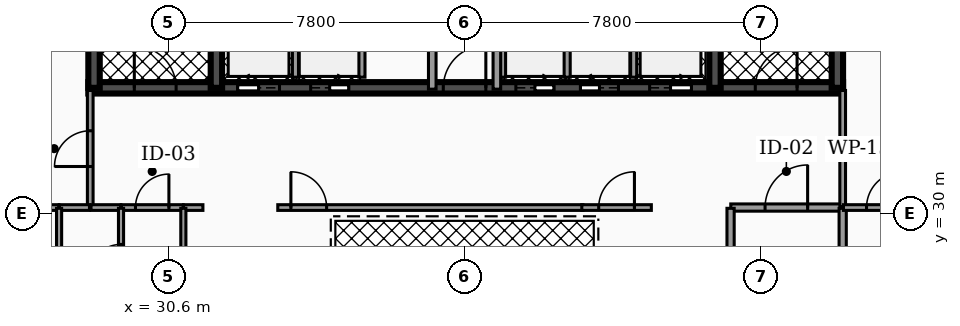
"""IFC4 building model, lengths in metres.
Left out: names, types, materials, properties, quantities, classifications, styles, units other than length and angle.
Written with IfcOpenShell. Run it as: python <this file> out.ifc"""

import sys

from ifc_helpers import new_model, si_unit, direction, frame, frame_2d, origin, place, context, subcontext, project, spatial, rectangle, extrude, element, fill, save


model = new_model("IFC4")
c1 = context("Model", 3, precision=1e-05, world=origin(), true_north=direction((0.0, 1.0)))
c2 = subcontext(c1, "Body", "Model", "MODEL_VIEW")
j1 = project(units=[si_unit("LENGTHUNIT", "METRE"), si_unit("PLANEANGLEUNIT", "RADIAN")], contexts=[c1])
p1 = place(None, origin())
s1 = spatial("IfcSite", under=j1, at=p1, CompositionType="ELEMENT")
p2 = place(p1, origin())
s2 = spatial("IfcBuilding", under=s1, at=p2, CompositionType="ELEMENT")
p3 = place(p2, frame((0.0, 0.0, 218.96)))
s3 = spatial("IfcBuildingStorey", under=s2, at=p3, CompositionType="ELEMENT", Elevation=218.96)
p4 = place(p3, frame((28.5, 33.3, 0.0), z_axis=(0.0, 0.0, 1.0), x_axis=(1.0, 0.0, 0.0)))
e1 = element("IfcWall", 1, at=p4, inside=s3, PredefinedType="SHEAR", context=c2, shape_type="SweptSolid", body=[
    extrude(rectangle(XDim=19.86, YDim=0.3, at=frame_2d((9.93, 0.0))), origin(), (0.0, 0.0, 1.0), 3.18),
])
p5 = place(p4, frame((3.93, 0.0, 0.0)))
e2 = element("IfcOpeningElement", 2, at=p5, cuts=e1, PredefinedType="OPENING", context=c2, shape_type="SweptSolid", body=[
    extrude(rectangle(XDim=1.1, YDim=2.15, at=frame_2d((0.55, 1.075))), frame((0.0, 0.16, 0.0), z_axis=(0.0, -1.0, 0.0), x_axis=(1.0, 0.0, 0.0)), (0.0, 0.0, 1.0), 0.32),
])
p6 = place(p4, frame((14.77, 0.0, 0.0)))
e3 = element("IfcOpeningElement", 3, at=p6, cuts=e1, PredefinedType="OPENING", context=c2, shape_type="SweptSolid", body=[
    extrude(rectangle(XDim=1.1, YDim=2.15, at=frame_2d((0.55, 1.075))), frame((0.0, 0.16, 0.0), z_axis=(0.0, -1.0, 0.0), x_axis=(1.0, 0.0, 0.0)), (0.0, 0.0, 1.0), 0.32),
])
p7 = place(p4, frame((11.25, 0.0, 0.0)))
e4 = element("IfcOpeningElement", 4, at=p7, cuts=e1, PredefinedType="OPENING", context=c2, shape_type="SweptSolid", body=[
    extrude(rectangle(XDim=1.0, YDim=2.1, at=frame_2d((0.5, 1.05))), frame((0.0, 0.16, 0.0), z_axis=(0.0, -1.0, 0.0), x_axis=(1.0, 0.0, 0.0)), (0.0, 0.0, 1.0), 0.32),
])
p8 = place(p4, frame((12.95, 0.0, 0.0)))
e5 = element("IfcOpeningElement", 5, at=p8, cuts=e1, PredefinedType="OPENING", context=c2, shape_type="SweptSolid", body=[
    extrude(rectangle(XDim=1.0, YDim=2.1, at=frame_2d((0.5, 1.05))), frame((0.0, 0.16, 0.0), z_axis=(0.0, -1.0, 0.0), x_axis=(1.0, 0.0, 0.0)), (0.0, 0.0, 1.0), 0.32),
])
p9 = place(p4, frame((5.85, 0.0, 0.0)))
e6 = element("IfcOpeningElement", 6, at=p9, cuts=e1, PredefinedType="OPENING", context=c2, shape_type="SweptSolid", body=[
    extrude(rectangle(XDim=1.0, YDim=2.1, at=frame_2d((0.5, 1.05))), frame((0.0, 0.16, 0.0), z_axis=(0.0, -1.0, 0.0), x_axis=(1.0, 0.0, 0.0)), (0.0, 0.0, 1.0), 0.32),
])
p10 = place(p4, frame((1.21, 0.0, 0.0)))
e7 = element("IfcOpeningElement", 7, at=p10, cuts=e1, PredefinedType="OPENING", context=c2, shape_type="SweptSolid", body=[
    extrude(rectangle(XDim=1.1, YDim=2.2, at=frame_2d((0.55, 1.1))), frame((0.0, 0.16, 0.0), z_axis=(0.0, -1.0, 0.0), x_axis=(1.0, 0.0, 0.0)), (0.0, 0.0, 1.0), 0.32),
])
p11 = place(p4, frame((9.34, 0.0, 0.0)))
e8 = element("IfcOpeningElement", 8, at=p11, cuts=e1, PredefinedType="OPENING", context=c2, shape_type="SweptSolid", body=[
    extrude(rectangle(XDim=1.12, YDim=2.05, at=frame_2d((0.56, 1.025))), frame((0.0, 0.16, 0.0), z_axis=(0.0, -1.0, 0.0), x_axis=(1.0, 0.0, 0.0)), (0.0, 0.0, 1.0), 0.32),
])
p12 = place(p4, frame((17.55, 0.0, 0.0)))
e9 = element("IfcOpeningElement", 9, at=p12, cuts=e1, PredefinedType="OPENING", context=c2, shape_type="SweptSolid", body=[
    extrude(rectangle(XDim=1.1, YDim=2.2, at=frame_2d((0.55, 1.1))), frame((0.0, 0.16, 0.0), z_axis=(0.0, -1.0, 0.0), x_axis=(1.0, 0.0, 0.0)), (0.0, 0.0, 1.0), 0.32),
])
for number, where, z_axis, x_axis in (
    (10, (28.65, 33.3, 0.0), (0.0, 0.0, 1.0), (0.0, 1.0, 0.0)),
    (11, (31.87, 33.3, 0.0), (0.0, 0.0, 1.0), (0.0, 1.0, 0.0)),
    (12, (44.99, 33.3, 0.0), (0.0, 0.0, 1.0), (0.0, 1.0, 0.0)),
    (13, (48.21, 33.3, 0.0), (0.0, 0.0, 1.0), (0.0, 1.0, 0.0)),
):
    element("IfcWall", number, at=place(p3, frame(where, z_axis=z_axis, x_axis=x_axis)), inside=s3, PredefinedType="SHEAR", context=c2, shape_type="SweptSolid", body=[
        extrude(rectangle(XDim=10.1, YDim=0.3, at=frame_2d((5.05, 0.0))), origin(), (0.0, 0.0, 1.0), 3.18),
    ])
for number, where, z_axis, x_axis in (
    (14, (33.95, 33.58, 0.0), (0.0, 0.0, 1.0), (0.0, 1.0, 0.0)),
    (15, (42.85, 33.58, 0.0), (0.0, 0.0, 1.0), (0.0, 1.0, 0.0)),
):
    element("IfcWall", number, at=place(p3, frame(where, z_axis=z_axis, x_axis=x_axis)), inside=s3, PredefinedType="SOLIDWALL", context=c2, shape_type="SweptSolid", body=[
        extrude(rectangle(XDim=2.45, YDim=0.16, at=frame_2d((1.225, 0.0))), origin(), (0.0, 0.0, 1.0), 3.18),
    ])
for number, where, z_axis, x_axis in (
    (16, (39.4, 33.58, 0.0), (0.0, 0.0, 1.0), (0.0, 1.0, 0.0)),
    (17, (41.1, 33.58, 0.0), (0.0, 0.0, 1.0), (0.0, 1.0, 0.0)),
    (18, (35.7, 33.58, 0.0), (0.0, 0.0, 1.0), (0.0, 1.0, 0.0)),
):
    element("IfcWall", number, at=place(p3, frame(where, z_axis=z_axis, x_axis=x_axis)), inside=s3, PredefinedType="SOLIDWALL", context=c2, shape_type="SweptSolid", body=[
        extrude(rectangle(XDim=2.25, YDim=0.16, at=frame_2d((1.125, 0.0))), origin(), (0.0, 0.0, 1.0), 3.18),
    ])
p13 = place(p3, frame((37.55, 33.265, 0.0), z_axis=(0.0, 0.0, 1.0), x_axis=(0.0, 1.0, 0.0)))
e19 = element("IfcWall", 19, at=p13, inside=s3, PredefinedType="PARTITIONING", context=c2, shape_type="SweptSolid", body=[
    extrude(rectangle(XDim=3.615, YDim=0.2, at=frame_2d((1.808, 0.0))), origin(), (0.0, 0.0, 1.0), 2.235),
])
p14 = place(p13, frame((1.367, 0.0, 0.0)))
e20 = element("IfcOpeningElement", 20, at=p14, cuts=e19, PredefinedType="OPENING", context=c2, shape_type="SweptSolid", body=[
    extrude(rectangle(XDim=0.88, YDim=2.05, at=frame_2d((0.44, 1.025))), frame((0.0, 0.11, 0.0), z_axis=(0.0, -1.0, 0.0), x_axis=(1.0, 0.0, 0.0)), (0.0, 0.0, 1.0), 0.22),
])
p15 = place(p3, frame((39.25, 33.265, 0.0), z_axis=(0.0, 0.0, 1.0), x_axis=(0.0, 1.0, 0.0)))
e21 = element("IfcWall", 21, at=p15, inside=s3, PredefinedType="PARTITIONING", context=c2, shape_type="SweptSolid", body=[
    extrude(rectangle(XDim=3.615, YDim=0.2, at=frame_2d((1.808, 0.0))), origin(), (0.0, 0.0, 1.0), 2.235),
])
p16 = place(p3, frame((45.405, 30.15, 0.0), z_axis=(0.0, 0.0, 1.0), x_axis=(1.0, 0.0, 0.0)))
e22 = element("IfcWall", 22, at=p16, inside=s3, PredefinedType="PARTITIONING", context=c2, shape_type="SweptSolid", body=[
    extrude(rectangle(XDim=2.925, YDim=0.19, at=frame_2d((1.462, 0.0))), origin(), (0.0, 0.0, 1.0), 2.235),
])
p17 = place(p16, frame((0.903, 0.0, 0.0)))
e23 = element("IfcOpeningElement", 23, at=p17, cuts=e22, PredefinedType="OPENING", context=c2, shape_type="SweptSolid", body=[
    extrude(rectangle(XDim=1.12, YDim=2.05, at=frame_2d((0.56, 1.025))), frame((0.0, 0.105, 0.0), z_axis=(0.0, -1.0, 0.0), x_axis=(1.0, 0.0, 0.0)), (0.0, 0.0, 1.0), 0.21),
])
p18 = place(p3, frame((28.55, 30.17, 0.0), z_axis=(0.0, 0.0, 1.0), x_axis=(0.0, 1.0, 0.0)))
e24 = element("IfcWall", 24, at=p18, inside=s3, PredefinedType="PARTITIONING", context=c2, shape_type="SweptSolid", body=[
    extrude(rectangle(XDim=3.06, YDim=0.15, at=frame_2d((1.53, 0.0))), origin(), (0.0, 0.0, 1.0), 2.235),
])
p19 = place(p18, frame((1.06, 0.0, 0.0)))
e25 = element("IfcOpeningElement", 25, at=p19, cuts=e24, PredefinedType="OPENING", context=c2, shape_type="SweptSolid", body=[
    extrude(rectangle(XDim=0.94, YDim=2.05, at=frame_2d((0.47, 1.025))), frame((0.0, 0.085, 0.0), z_axis=(0.0, -1.0, 0.0), x_axis=(1.0, 0.0, 0.0)), (0.0, 0.0, 1.0), 0.17),
])
p20 = place(p3, frame((48.35, 30.17, 0.0), z_axis=(0.0, 0.0, 1.0), x_axis=(0.0, 1.0, 0.0)))
e26 = element("IfcWall", 26, at=p20, inside=s3, PredefinedType="PARTITIONING", context=c2, shape_type="SweptSolid", body=[
    extrude(rectangle(XDim=3.06, YDim=0.15, at=frame_2d((1.53, 0.0))), origin(), (0.0, 0.0, 1.0), 2.235),
])
p21 = place(p3, frame((29.365, 30.15, 0.0), z_axis=(0.0, 0.0, 1.0), x_axis=(1.0, 0.0, 0.0)))
e27 = element("IfcWall", 27, at=p21, inside=s3, PredefinedType="PARTITIONING", context=c2, shape_type="SweptSolid", body=[
    extrude(rectangle(XDim=1.63, YDim=0.15, at=frame_2d((0.815, 0.0))), origin(), (0.0, 0.0, 1.0), 2.235),
])
p22 = place(p21, frame((0.375, 0.0, 0.0)))
e28 = element("IfcOpeningElement", 28, at=p22, cuts=e27, PredefinedType="OPENING", context=c2, shape_type="SweptSolid", body=[
    extrude(rectangle(XDim=0.88, YDim=2.05, at=frame_2d((0.44, 1.025))), frame((0.0, 0.085, 0.0), z_axis=(0.0, -1.0, 0.0), x_axis=(1.0, 0.0, 0.0)), (0.0, 0.0, 1.0), 0.17),
])
p23 = place(p3, frame((28.57, 30.15, 0.0), z_axis=(0.0, 0.0, 1.0), x_axis=(1.0, 0.0, 0.0)))
e29 = element("IfcWall", 29, at=p23, inside=s3, PredefinedType="PARTITIONING", context=c2, shape_type="SweptSolid", body=[
    extrude(rectangle(XDim=0.785, YDim=0.15, at=frame_2d((0.393, 0.0))), origin(), (0.0, 0.0, 1.0), 2.235),
])
p24 = place(p3, frame((33.485, 30.15, 0.0), z_axis=(0.0, 0.0, 1.0), x_axis=(1.0, 0.0, 0.0)))
e30 = element("IfcWall", 30, at=p24, inside=s3, PredefinedType="PARTITIONING", context=c2, shape_type="SweptSolid", body=[
    extrude(rectangle(XDim=8.03, YDim=0.15, at=frame_2d((4.015, 0.0))), origin(), (0.0, 0.0, 1.0), 2.235),
])
p25 = place(p24, frame((0.345, 0.0, 0.0)))
e31 = element("IfcOpeningElement", 31, at=p25, cuts=e30, PredefinedType="OPENING", context=c2, shape_type="SweptSolid", body=[
    extrude(rectangle(XDim=0.94, YDim=2.05, at=frame_2d((0.47, 1.025))), frame((0.0, 0.085, 0.0), z_axis=(0.0, -1.0, 0.0), x_axis=(1.0, 0.0, 0.0)), (0.0, 0.0, 1.0), 0.17),
])
p26 = place(p3, frame((31.005, 30.15, 0.0), z_axis=(0.0, 0.0, 1.0), x_axis=(1.0, 0.0, 0.0)))
e32 = element("IfcWall", 32, at=p26, inside=s3, PredefinedType="PARTITIONING", context=c2, shape_type="SweptSolid", body=[
    extrude(rectangle(XDim=0.51, YDim=0.15, at=frame_2d((0.255, 0.0))), origin(), (0.0, 0.0, 1.0), 2.235),
])
p27 = place(p3, frame((41.485, 30.15, 0.0), z_axis=(0.0, 0.0, 1.0), x_axis=(1.0, 0.0, 0.0)))
e33 = element("IfcWall", 33, at=p27, inside=s3, PredefinedType="PARTITIONING", context=c2, shape_type="SweptSolid", body=[
    extrude(rectangle(XDim=1.83, YDim=0.15, at=frame_2d((0.915, 0.0))), origin(), (0.0, 0.0, 1.0), 2.235),
])
p28 = place(p27, frame((0.445, 0.0, 0.0)))
e34 = element("IfcOpeningElement", 34, at=p28, cuts=e33, PredefinedType="OPENING", context=c2, shape_type="SweptSolid", body=[
    extrude(rectangle(XDim=0.94, YDim=2.05, at=frame_2d((0.47, 1.025))), frame((0.0, 0.085, 0.0), z_axis=(0.0, -1.0, 0.0), x_axis=(1.0, 0.0, 0.0)), (0.0, 0.0, 1.0), 0.17),
])
for number, where, z_axis, x_axis in (
    (35, (45.4, 27.37, 0.0), (0.0, 0.0, 1.0), (0.0, 1.0, 0.0)),
    (36, (48.35, 27.37, 0.0), (0.0, 0.0, 1.0), (0.0, 1.0, 0.0)),
):
    element("IfcWall", number, at=place(p3, frame(where, z_axis=z_axis, x_axis=x_axis)), inside=s3, PredefinedType="PARTITIONING", context=c2, shape_type="SweptSolid", body=[
        extrude(rectangle(XDim=2.76, YDim=0.19, at=frame_2d((1.38, 0.0))), origin(), (0.0, 0.0, 1.0), 2.235),
    ])
p29 = place(p3, frame((26.275, 30.15, 0.0), z_axis=(0.0, 0.0, 1.0), x_axis=(1.0, 0.0, 0.0)))
e37 = element("IfcWall", 37, at=p29, inside=s3, PredefinedType="PARTITIONING", context=c2, shape_type="SweptSolid", body=[
    extrude(rectangle(XDim=1.45, YDim=0.15, at=frame_2d((0.725, 0.0))), origin(), (0.0, 0.0, 1.0), 2.235),
])
p30 = place(p29, frame((0.285, 0.0, 0.0)))
e38 = element("IfcOpeningElement", 38, at=p30, cuts=e37, PredefinedType="OPENING", context=c2, shape_type="SweptSolid", body=[
    extrude(rectangle(XDim=0.88, YDim=2.05, at=frame_2d((0.44, 1.025))), frame((0.0, 0.085, 0.0), z_axis=(0.0, -1.0, 0.0), x_axis=(1.0, 0.0, 0.0)), (0.0, 0.0, 1.0), 0.17),
])
p31 = place(p3, frame((27.735, 30.15, 0.0), z_axis=(0.0, 0.0, 1.0), x_axis=(1.0, 0.0, 0.0)))
e39 = element("IfcWall", 39, at=p31, inside=s3, PredefinedType="PARTITIONING", context=c2, shape_type="SweptSolid", body=[
    extrude(rectangle(XDim=0.795, YDim=0.15, at=frame_2d((0.397, 0.0))), origin(), (0.0, 0.0, 1.0), 2.235),
])
p32 = place(p3, frame((48.37, 30.15, 0.0), z_axis=(0.0, 0.0, 1.0), x_axis=(1.0, 0.0, 0.0)))
e40 = element("IfcWall", 40, at=p32, inside=s3, PredefinedType="PARTITIONING", context=c2, shape_type="SweptSolid", body=[
    extrude(rectangle(XDim=2.155, YDim=0.15, at=frame_2d((1.078, 0.0))), origin(), (0.0, 0.0, 1.0), 2.235),
])
p33 = place(p32, frame((0.608, 0.0, 0.0)))
e41 = element("IfcOpeningElement", 41, at=p33, cuts=e40, PredefinedType="OPENING", context=c2, shape_type="SweptSolid", body=[
    extrude(rectangle(XDim=0.94, YDim=2.05, at=frame_2d((0.47, 1.025))), frame((0.0, 0.085, 0.0), z_axis=(0.0, -1.0, 0.0), x_axis=(1.0, 0.0, 0.0)), (0.0, 0.0, 1.0), 0.17),
])
p34 = place(p3, frame((29.36, 27.37, 0.0), z_axis=(0.0, 0.0, 1.0), x_axis=(0.0, 1.0, 0.0)))
e42 = element("IfcWall", 42, at=p34, inside=s3, PredefinedType="PARTITIONING", context=c2, shape_type="SweptSolid", body=[
    extrude(rectangle(XDim=2.76, YDim=0.135, at=frame_2d((1.38, 0.0))), origin(), (0.0, 0.0, 1.0), 2.235),
])
p35 = place(p34, frame((0.95, 0.0, 0.0)))
e43 = element("IfcOpeningElement", 43, at=p35, cuts=e42, PredefinedType="OPENING", context=c2, shape_type="SweptSolid", body=[
    extrude(rectangle(XDim=0.86, YDim=2.05, at=frame_2d((0.43, 1.025))), frame((0.0, 0.077, 0.0), z_axis=(0.0, -1.0, 0.0), x_axis=(1.0, 0.0, 0.0)), (0.0, 0.0, 1.0), 0.155),
])
for number, where, z_axis, x_axis in (
    (44, (31.0, 27.37, 0.0), (0.0, 0.0, 1.0), (0.0, 1.0, 0.0)),
    (45, (27.73, 27.37, 0.0), (0.0, 0.0, 1.0), (0.0, 1.0, 0.0)),
):
    element("IfcWall", number, at=place(p3, frame(where, z_axis=z_axis, x_axis=x_axis)), inside=s3, PredefinedType="PARTITIONING", context=c2, shape_type="SweptSolid", body=[
        extrude(rectangle(XDim=2.76, YDim=0.135, at=frame_2d((1.38, 0.0))), origin(), (0.0, 0.0, 1.0), 2.235),
    ])
p36 = place(p5, origin())
e46 = element("IfcDoor", 46, at=p36, inside=s3, OperationType="SLIDING_TO_LEFT", PredefinedType="DOOR", context=c2, shape_type="SweptSolid", body=[
    extrude(rectangle(XDim=1.1, YDim=2.15, at=frame_2d((0.55, 1.075))), frame((0.0, 0.025, 0.0), z_axis=(0.0, -1.0, 0.0), x_axis=(1.0, 0.0, 0.0)), (0.0, 0.0, 1.0), 0.05),
])
fill(e2, e46)
p37 = place(p6, origin())
e47 = element("IfcDoor", 47, at=p37, inside=s3, OperationType="SLIDING_TO_RIGHT", PredefinedType="DOOR", context=c2, shape_type="SweptSolid", body=[
    extrude(rectangle(XDim=1.1, YDim=2.15, at=frame_2d((0.55, 1.075))), frame((0.0, 0.025, 0.0), z_axis=(0.0, -1.0, 0.0), x_axis=(1.0, 0.0, 0.0)), (0.0, 0.0, 1.0), 0.05),
])
fill(e3, e47)
p38 = place(p7, origin())
e48 = element("IfcDoor", 48, at=p38, inside=s3, OperationType="SLIDING_TO_RIGHT", PredefinedType="DOOR", context=c2, shape_type="SweptSolid", body=[
    extrude(rectangle(XDim=1.0, YDim=2.1, at=frame_2d((0.5, 1.05))), frame((0.0, 0.025, 0.0), z_axis=(0.0, -1.0, 0.0), x_axis=(1.0, 0.0, 0.0)), (0.0, 0.0, 1.0), 0.05),
])
fill(e4, e48)
p39 = place(p8, origin())
e49 = element("IfcDoor", 49, at=p39, inside=s3, OperationType="SLIDING_TO_LEFT", PredefinedType="DOOR", context=c2, shape_type="SweptSolid", body=[
    extrude(rectangle(XDim=1.0, YDim=2.1, at=frame_2d((0.5, 1.05))), frame((0.0, 0.025, 0.0), z_axis=(0.0, -1.0, 0.0), x_axis=(1.0, 0.0, 0.0)), (0.0, 0.0, 1.0), 0.05),
])
fill(e5, e49)
p40 = place(p9, origin())
e50 = element("IfcDoor", 50, at=p40, inside=s3, OperationType="SLIDING_TO_RIGHT", PredefinedType="DOOR", context=c2, shape_type="SweptSolid", body=[
    extrude(rectangle(XDim=1.0, YDim=2.1, at=frame_2d((0.5, 1.05))), frame((0.0, 0.025, 0.0), z_axis=(0.0, -1.0, 0.0), x_axis=(1.0, 0.0, 0.0)), (0.0, 0.0, 1.0), 0.05),
])
fill(e6, e50)
p41 = place(p10, origin())
e51 = element("IfcDoor", 51, at=p41, inside=s3, OperationType="SINGLE_SWING_LEFT", PredefinedType="DOOR", context=c2, shape_type="SweptSolid", body=[
    extrude(rectangle(XDim=1.1, YDim=2.2, at=frame_2d((0.55, 1.1))), frame((0.0, 0.025, 0.0), z_axis=(0.0, -1.0, 0.0), x_axis=(1.0, 0.0, 0.0)), (0.0, 0.0, 1.0), 0.05),
])
fill(e7, e51)
p42 = place(p11, origin())
e52 = element("IfcDoor", 52, at=p42, inside=s3, OperationType="SINGLE_SWING_RIGHT", PredefinedType="DOOR", context=c2, shape_type="SweptSolid", body=[
    extrude(rectangle(XDim=1.12, YDim=2.05, at=frame_2d((0.56, 1.025))), frame((0.0, 0.025, 0.0), z_axis=(0.0, -1.0, 0.0), x_axis=(1.0, 0.0, 0.0)), (0.0, 0.0, 1.0), 0.05),
])
fill(e8, e52)
p43 = place(p12, origin())
e53 = element("IfcDoor", 53, at=p43, inside=s3, OperationType="SINGLE_SWING_RIGHT", PredefinedType="DOOR", context=c2, shape_type="SweptSolid", body=[
    extrude(rectangle(XDim=1.1, YDim=2.2, at=frame_2d((0.55, 1.1))), frame((0.0, 0.025, 0.0), z_axis=(0.0, -1.0, 0.0), x_axis=(1.0, 0.0, 0.0)), (0.0, 0.0, 1.0), 0.05),
])
fill(e9, e53)
p44 = place(p17, origin())
e54 = element("IfcDoor", 54, at=p44, inside=s3, OperationType="SINGLE_SWING_RIGHT", PredefinedType="DOOR", context=c2, shape_type="SweptSolid", body=[
    extrude(rectangle(XDim=1.12, YDim=2.05, at=frame_2d((0.56, 1.025))), frame((0.0, 0.025, 0.0), z_axis=(0.0, -1.0, 0.0), x_axis=(1.0, 0.0, 0.0)), (0.0, 0.0, 1.0), 0.05),
])
fill(e23, e54)
p45 = place(p19, origin())
e55 = element("IfcDoor", 55, at=p45, inside=s3, OperationType="SINGLE_SWING_LEFT", PredefinedType="DOOR", context=c2, shape_type="SweptSolid", body=[
    extrude(rectangle(XDim=0.94, YDim=2.05, at=frame_2d((0.47, 1.025))), frame((0.0, 0.025, 0.0), z_axis=(0.0, -1.0, 0.0), x_axis=(1.0, 0.0, 0.0)), (0.0, 0.0, 1.0), 0.05),
])
fill(e25, e55)
p46 = place(p22, origin())
e56 = element("IfcDoor", 56, at=p46, inside=s3, OperationType="SINGLE_SWING_RIGHT", PredefinedType="DOOR", context=c2, shape_type="SweptSolid", body=[
    extrude(rectangle(XDim=0.88, YDim=2.05, at=frame_2d((0.44, 1.025))), frame((0.0, 0.025, 0.0), z_axis=(0.0, -1.0, 0.0), x_axis=(1.0, 0.0, 0.0)), (0.0, 0.0, 1.0), 0.05),
])
fill(e28, e56)
p47 = place(p25, origin())
e57 = element("IfcDoor", 57, at=p47, inside=s3, OperationType="SINGLE_SWING_LEFT", PredefinedType="DOOR", context=c2, shape_type="SweptSolid", body=[
    extrude(rectangle(XDim=0.94, YDim=2.05, at=frame_2d((0.47, 1.025))), frame((0.0, 0.025, 0.0), z_axis=(0.0, -1.0, 0.0), x_axis=(1.0, 0.0, 0.0)), (0.0, 0.0, 1.0), 0.05),
])
fill(e31, e57)
p48 = place(p28, origin())
e58 = element("IfcDoor", 58, at=p48, inside=s3, OperationType="SINGLE_SWING_RIGHT", PredefinedType="DOOR", context=c2, shape_type="SweptSolid", body=[
    extrude(rectangle(XDim=0.94, YDim=2.05, at=frame_2d((0.47, 1.025))), frame((0.0, 0.025, 0.0), z_axis=(0.0, -1.0, 0.0), x_axis=(1.0, 0.0, 0.0)), (0.0, 0.0, 1.0), 0.05),
])
fill(e34, e58)
p49 = place(p33, origin())
e59 = element("IfcDoor", 59, at=p49, inside=s3, OperationType="SINGLE_SWING_RIGHT", PredefinedType="DOOR", context=c2, shape_type="SweptSolid", body=[
    extrude(rectangle(XDim=0.94, YDim=2.05, at=frame_2d((0.47, 1.025))), frame((0.0, 0.025, 0.0), z_axis=(0.0, -1.0, 0.0), x_axis=(1.0, 0.0, 0.0)), (0.0, 0.0, 1.0), 0.05),
])
fill(e41, e59)
p50 = place(p35, origin())
e60 = element("IfcDoor", 60, at=p50, inside=s3, OperationType="SINGLE_SWING_LEFT", PredefinedType="DOOR", context=c2, shape_type="SweptSolid", body=[
    extrude(rectangle(XDim=0.86, YDim=2.05, at=frame_2d((0.43, 1.025))), frame((0.0, 0.025, 0.0), z_axis=(0.0, -1.0, 0.0), x_axis=(1.0, 0.0, 0.0)), (0.0, 0.0, 1.0), 0.05),
])
fill(e43, e60)
save(model, sys.argv[1])
